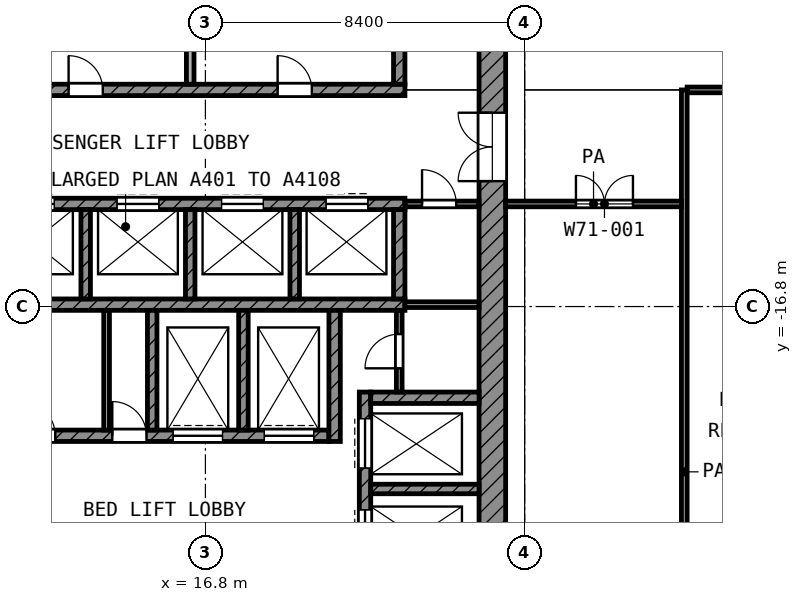
"""IFC4 building model, lengths in metres.
Left out: names, types, materials, properties, quantities, classifications, styles, units other than length and angle.
Written with IfcOpenShell. Run it as: python <this file> out.ifc"""

import sys

from ifc_helpers import new_model, si_unit, direction, frame, frame_2d, origin, place, context, subcontext, project, spatial, rectangle, extrude, element, fill, save


model = new_model("IFC4")
c1 = context("Model", 3, precision=1e-05, world=origin(), true_north=direction((0.0, 1.0)))
c2 = subcontext(c1, "Body", "Model", "MODEL_VIEW")
j1 = project(units=[si_unit("LENGTHUNIT", "METRE"), si_unit("PLANEANGLEUNIT", "RADIAN")], contexts=[c1])
p1 = place(None, origin())
s1 = spatial("IfcSite", under=j1, at=p1, CompositionType="ELEMENT")
p2 = place(p1, origin())
s2 = spatial("IfcBuilding", under=s1, at=p2, CompositionType="ELEMENT")
p3 = place(p2, frame((0.0, 0.0, 328.0)))
s3 = spatial("IfcBuildingStorey", under=s2, at=p3, CompositionType="ELEMENT", Elevation=328.0)
p4 = place(p3, frame((24.35, -24.0, 0.0), z_axis=(0.0, 0.0, 1.0), x_axis=(0.0, 1.0, 0.0)))
e1 = element("IfcWall", 1, at=p4, inside=s3, PredefinedType="SHEAR", context=c2, shape_type="SweptSolid", body=[
    extrude(rectangle(XDim=18.6, YDim=0.7, at=frame_2d((9.3, 0.0))), origin(), (0.0, 0.0, 1.0), 3.78),
])
p5 = place(p4, frame((10.5, 0.0, 0.0)))
e2 = element("IfcOpeningElement", 2, at=p5, cuts=e1, PredefinedType="OPENING", context=c2, shape_type="SweptSolid", body=[
    extrude(rectangle(XDim=1.8, YDim=2.1, at=frame_2d((0.9, 1.05))), frame((0.0, 0.36, 0.0), z_axis=(0.0, -1.0, 0.0), x_axis=(1.0, 0.0, 0.0)), (0.0, 0.0, 1.0), 0.72),
])
p6 = place(p3, frame((5.4, -11.1, 0.0), z_axis=(0.0, 0.0, 1.0), x_axis=(1.0, 0.0, 0.0)))
e3 = element("IfcWall", 3, at=p6, inside=s3, PredefinedType="SHEAR", context=c2, shape_type="SweptSolid", body=[
    extrude(rectangle(XDim=16.65, YDim=0.3, at=frame_2d((8.325, 0.0))), origin(), (0.0, 0.0, 1.0), 3.78),
])
p7 = place(p6, frame((2.3, 0.0, 0.0)))
e4 = element("IfcOpeningElement", 4, at=p7, cuts=e3, PredefinedType="OPENING", context=c2, shape_type="SweptSolid", body=[
    extrude(rectangle(XDim=0.9, YDim=2.1, at=frame_2d((0.45, 1.05))), frame((0.0, 0.16, 0.0), z_axis=(0.0, -1.0, 0.0), x_axis=(1.0, 0.0, 0.0)), (0.0, 0.0, 1.0), 0.32),
])
p8 = place(p6, frame((7.8, 0.0, 0.0)))
e5 = element("IfcOpeningElement", 5, at=p8, cuts=e3, PredefinedType="OPENING", context=c2, shape_type="SweptSolid", body=[
    extrude(rectangle(XDim=0.9, YDim=2.1, at=frame_2d((0.45, 1.05))), frame((0.0, 0.16, 0.0), z_axis=(0.0, -1.0, 0.0), x_axis=(1.0, 0.0, 0.0)), (0.0, 0.0, 1.0), 0.32),
])
p9 = place(p6, frame((13.3, 0.0, 0.0)))
e6 = element("IfcOpeningElement", 6, at=p9, cuts=e3, PredefinedType="OPENING", context=c2, shape_type="SweptSolid", body=[
    extrude(rectangle(XDim=0.9, YDim=2.1, at=frame_2d((0.45, 1.05))), frame((0.0, 0.16, 0.0), z_axis=(0.0, -1.0, 0.0), x_axis=(1.0, 0.0, 0.0)), (0.0, 0.0, 1.0), 0.32),
])
p10 = place(p3, frame((5.4, -14.1, 0.0), z_axis=(0.0, 0.0, 1.0), x_axis=(1.0, 0.0, 0.0)))
e7 = element("IfcWall", 7, at=p10, inside=s3, PredefinedType="SHEAR", context=c2, shape_type="SweptSolid", body=[
    extrude(rectangle(XDim=16.65, YDim=0.3, at=frame_2d((8.325, 0.0))), origin(), (0.0, 0.0, 1.0), 3.78),
])
p11 = place(p10, frame((6.325, 0.0, 0.0)))
e8 = element("IfcOpeningElement", 8, at=p11, cuts=e7, PredefinedType="OPENING", context=c2, shape_type="SweptSolid", body=[
    extrude(rectangle(XDim=1.1, YDim=2.1, at=frame_2d((0.55, 1.05))), frame((0.0, 0.16, 0.0), z_axis=(0.0, -1.0, 0.0), x_axis=(1.0, 0.0, 0.0)), (0.0, 0.0, 1.0), 0.32),
])
p12 = place(p10, frame((9.075, 0.0, 0.0)))
e9 = element("IfcOpeningElement", 9, at=p12, cuts=e7, PredefinedType="OPENING", context=c2, shape_type="SweptSolid", body=[
    extrude(rectangle(XDim=1.1, YDim=2.1, at=frame_2d((0.55, 1.05))), frame((0.0, 0.16, 0.0), z_axis=(0.0, -1.0, 0.0), x_axis=(1.0, 0.0, 0.0)), (0.0, 0.0, 1.0), 0.32),
])
p13 = place(p10, frame((11.825, 0.0, 0.0)))
e10 = element("IfcOpeningElement", 10, at=p13, cuts=e7, PredefinedType="OPENING", context=c2, shape_type="SweptSolid", body=[
    extrude(rectangle(XDim=1.1, YDim=2.1, at=frame_2d((0.55, 1.05))), frame((0.0, 0.16, 0.0), z_axis=(0.0, -1.0, 0.0), x_axis=(1.0, 0.0, 0.0)), (0.0, 0.0, 1.0), 0.32),
])
p14 = place(p10, frame((14.575, 0.0, 0.0)))
e11 = element("IfcOpeningElement", 11, at=p14, cuts=e7, PredefinedType="OPENING", context=c2, shape_type="SweptSolid", body=[
    extrude(rectangle(XDim=1.1, YDim=2.1, at=frame_2d((0.55, 1.05))), frame((0.0, 0.16, 0.0), z_axis=(0.0, -1.0, 0.0), x_axis=(1.0, 0.0, 0.0)), (0.0, 0.0, 1.0), 0.32),
])
p15 = place(p10, frame((2.3, 0.0, 0.0)))
e12 = element("IfcOpeningElement", 12, at=p15, cuts=e7, PredefinedType="OPENING", context=c2, shape_type="SweptSolid", body=[
    extrude(rectangle(XDim=0.9, YDim=2.1, at=frame_2d((0.45, 1.05))), frame((0.0, 0.16, 0.0), z_axis=(0.0, -1.0, 0.0), x_axis=(1.0, 0.0, 0.0)), (0.0, 0.0, 1.0), 0.32),
])
p16 = place(p3, frame((5.4, -16.75, 0.0), z_axis=(0.0, 0.0, 1.0), x_axis=(1.0, 0.0, 0.0)))
e13 = element("IfcWall", 13, at=p16, inside=s3, PredefinedType="SHEAR", context=c2, shape_type="SweptSolid", body=[
    extrude(rectangle(XDim=16.65, YDim=0.3, at=frame_2d((8.325, 0.0))), origin(), (0.0, 0.0, 1.0), 3.78),
])
p17 = place(p3, frame((5.4, -20.2, 0.0), z_axis=(0.0, 0.0, 1.0), x_axis=(1.0, 0.0, 0.0)))
e14 = element("IfcWall", 14, at=p17, inside=s3, PredefinedType="SHEAR", context=c2, shape_type="SweptSolid", body=[
    extrude(rectangle(XDim=14.65, YDim=0.3, at=frame_2d((7.325, 0.0))), origin(), (0.0, 0.0, 1.0), 3.78),
])
p18 = place(p17, frame((10.55, 0.0, 0.0)))
e15 = element("IfcOpeningElement", 15, at=p18, cuts=e14, PredefinedType="OPENING", context=c2, shape_type="SweptSolid", body=[
    extrude(rectangle(XDim=1.3, YDim=2.1, at=frame_2d((0.65, 1.05))), frame((0.0, 0.16, 0.0), z_axis=(0.0, -1.0, 0.0), x_axis=(1.0, 0.0, 0.0)), (0.0, 0.0, 1.0), 0.32),
])
p19 = place(p17, frame((12.95, 0.0, 0.0)))
e16 = element("IfcOpeningElement", 16, at=p19, cuts=e14, PredefinedType="OPENING", context=c2, shape_type="SweptSolid", body=[
    extrude(rectangle(XDim=1.3, YDim=2.1, at=frame_2d((0.65, 1.05))), frame((0.0, 0.16, 0.0), z_axis=(0.0, -1.0, 0.0), x_axis=(1.0, 0.0, 0.0)), (0.0, 0.0, 1.0), 0.32),
])
p20 = place(p17, frame((0.55, 0.0, 0.0)))
e17 = element("IfcOpeningElement", 17, at=p20, cuts=e14, PredefinedType="OPENING", context=c2, shape_type="SweptSolid", body=[
    extrude(rectangle(XDim=1.3, YDim=2.1, at=frame_2d((0.65, 1.05))), frame((0.0, 0.16, 0.0), z_axis=(0.0, -1.0, 0.0), x_axis=(1.0, 0.0, 0.0)), (0.0, 0.0, 1.0), 0.32),
])
p21 = place(p17, frame((2.95, 0.0, 0.0)))
e18 = element("IfcOpeningElement", 18, at=p21, cuts=e14, PredefinedType="OPENING", context=c2, shape_type="SweptSolid", body=[
    extrude(rectangle(XDim=1.3, YDim=2.1, at=frame_2d((0.65, 1.05))), frame((0.0, 0.16, 0.0), z_axis=(0.0, -1.0, 0.0), x_axis=(1.0, 0.0, 0.0)), (0.0, 0.0, 1.0), 0.32),
])
p22 = place(p17, frame((6.55, 0.0, 0.0)))
e19 = element("IfcOpeningElement", 19, at=p22, cuts=e14, PredefinedType="OPENING", context=c2, shape_type="SweptSolid", body=[
    extrude(rectangle(XDim=0.9, YDim=2.1, at=frame_2d((0.45, 1.05))), frame((0.0, 0.16, 0.0), z_axis=(0.0, -1.0, 0.0), x_axis=(1.0, 0.0, 0.0)), (0.0, 0.0, 1.0), 0.32),
])
p23 = place(p17, frame((8.95, 0.0, 0.0)))
e20 = element("IfcOpeningElement", 20, at=p23, cuts=e14, PredefinedType="OPENING", context=c2, shape_type="SweptSolid", body=[
    extrude(rectangle(XDim=0.9, YDim=2.1, at=frame_2d((0.45, 1.05))), frame((0.0, 0.16, 0.0), z_axis=(0.0, -1.0, 0.0), x_axis=(1.0, 0.0, 0.0)), (0.0, 0.0, 1.0), 0.32),
])
p24 = place(p3, frame((20.2, -20.35, 0.0), z_axis=(0.0, 0.0, 1.0), x_axis=(0.0, 1.0, 0.0)))
e21 = element("IfcWall", 21, at=p24, inside=s3, PredefinedType="SHEAR", context=c2, shape_type="SweptSolid", body=[
    extrude(rectangle(XDim=3.45, YDim=0.3, at=frame_2d((1.725, 0.0))), origin(), (0.0, 0.0, 1.0), 3.78),
])
p25 = place(p3, frame((21.9, -10.95, 0.0), z_axis=(0.0, 0.0, 1.0), x_axis=(0.0, 1.0, 0.0)))
e22 = element("IfcWall", 22, at=p25, inside=s3, PredefinedType="SHEAR", context=c2, shape_type="SweptSolid", body=[
    extrude(rectangle(XDim=2.35, YDim=0.3, at=frame_2d((1.175, 0.0))), origin(), (0.0, 0.0, 1.0), 3.78),
])
p26 = place(p3, frame((21.9, -16.6, 0.0), z_axis=(0.0, 0.0, 1.0), x_axis=(0.0, 1.0, 0.0)))
e23 = element("IfcWall", 23, at=p26, inside=s3, PredefinedType="SHEAR", context=c2, shape_type="SweptSolid", body=[
    extrude(rectangle(XDim=2.35, YDim=0.3, at=frame_2d((1.175, 0.0))), origin(), (0.0, 0.0, 1.0), 3.78),
])
p27 = place(p3, frame((21.15, -19.2, 0.0), z_axis=(0.0, 0.0, 1.0), x_axis=(1.0, 0.0, 0.0)))
e24 = element("IfcWall", 24, at=p27, inside=s3, PredefinedType="SHEAR", context=c2, shape_type="SweptSolid", body=[
    extrude(rectangle(XDim=2.85, YDim=0.3, at=frame_2d((1.425, 0.0))), origin(), (0.0, 0.0, 1.0), 3.78),
])
p28 = place(p3, frame((21.0, -24.0, 0.0), z_axis=(0.0, 0.0, 1.0), x_axis=(0.0, 1.0, 0.0)))
e25 = element("IfcWall", 25, at=p28, inside=s3, PredefinedType="SHEAR", context=c2, shape_type="SweptSolid", body=[
    extrude(rectangle(XDim=4.95, YDim=0.3, at=frame_2d((2.475, 0.0))), origin(), (0.0, 0.0, 1.0), 3.78),
])
p29 = place(p28, frame((2.95, 0.0, 0.0)))
e26 = element("IfcOpeningElement", 26, at=p29, cuts=e25, PredefinedType="OPENING", context=c2, shape_type="SweptSolid", body=[
    extrude(rectangle(XDim=1.3, YDim=2.1, at=frame_2d((0.65, 1.05))), frame((0.0, 0.16, 0.0), z_axis=(0.0, -1.0, 0.0), x_axis=(1.0, 0.0, 0.0)), (0.0, 0.0, 1.0), 0.32),
])
p30 = place(p28, frame((0.55, 0.0, 0.0)))
e27 = element("IfcOpeningElement", 27, at=p30, cuts=e25, PredefinedType="OPENING", context=c2, shape_type="SweptSolid", body=[
    extrude(rectangle(XDim=1.3, YDim=2.1, at=frame_2d((0.65, 1.05))), frame((0.0, 0.16, 0.0), z_axis=(0.0, -1.0, 0.0), x_axis=(1.0, 0.0, 0.0)), (0.0, 0.0, 1.0), 0.32),
])
p31 = place(p3, frame((21.15, -21.6, 0.0), z_axis=(0.0, 0.0, 1.0), x_axis=(1.0, 0.0, 0.0)))
e28 = element("IfcWall", 28, at=p31, inside=s3, PredefinedType="SHEAR", context=c2, shape_type="SweptSolid", body=[
    extrude(rectangle(XDim=2.85, YDim=0.25, at=frame_2d((1.425, 0.0))), origin(), (0.0, 0.0, 1.0), 3.78),
])
for number, where, z_axis, x_axis in (
    (29, (15.4, -20.05, 0.0), (0.0, 0.0, 1.0), (0.0, 1.0, 0.0)),
    (30, (17.8, -20.05, 0.0), (0.0, 0.0, 1.0), (0.0, 1.0, 0.0)),
):
    element("IfcWall", number, at=place(p3, frame(where, z_axis=z_axis, x_axis=x_axis)), inside=s3, PredefinedType="SHEAR", context=c2, shape_type="SweptSolid", body=[
        extrude(rectangle(XDim=3.15, YDim=0.25, at=frame_2d((1.575, 0.0))), origin(), (0.0, 0.0, 1.0), 3.78),
    ])
p32 = place(p3, frame((16.4, -10.95, 0.0), z_axis=(0.0, 0.0, 1.0), x_axis=(0.0, 1.0, 0.0)))
e31 = element("IfcWall", 31, at=p32, inside=s3, PredefinedType="PARTITIONING", context=c2, shape_type="SweptSolid", body=[
    extrude(rectangle(XDim=2.35, YDim=0.2, at=frame_2d((1.175, 0.0))), origin(), (0.0, 0.0, 1.0), 3.78),
])
for number, where, z_axis, x_axis in (
    (32, (13.65, -16.6, 0.0), (0.0, 0.0, 1.0), (0.0, 1.0, 0.0)),
    (33, (16.4, -16.6, 0.0), (0.0, 0.0, 1.0), (0.0, 1.0, 0.0)),
    (34, (19.15, -16.6, 0.0), (0.0, 0.0, 1.0), (0.0, 1.0, 0.0)),
):
    element("IfcWall", number, at=place(p3, frame(where, z_axis=z_axis, x_axis=x_axis)), inside=s3, PredefinedType="SHEAR", context=c2, shape_type="SweptSolid", body=[
        extrude(rectangle(XDim=2.35, YDim=0.25, at=frame_2d((1.175, 0.0))), origin(), (0.0, 0.0, 1.0), 3.78),
    ])
p33 = place(p3, frame((21.9, -19.05, 0.0), z_axis=(0.0, 0.0, 1.0), x_axis=(0.0, 1.0, 0.0)))
e35 = element("IfcWall", 35, at=p33, inside=s3, PredefinedType="PARTITIONING", context=c2, shape_type="SweptSolid", body=[
    extrude(rectangle(XDim=2.15, YDim=0.15, at=frame_2d((1.075, 0.0))), origin(), (0.0, 0.0, 1.0), 3.78),
])
p34 = place(p33, frame((0.625, 0.0, 0.0)))
e36 = element("IfcOpeningElement", 36, at=p34, cuts=e35, PredefinedType="OPENING", context=c2, shape_type="SweptSolid", body=[
    extrude(rectangle(XDim=0.9, YDim=2.1, at=frame_2d((0.45, 1.05))), frame((0.0, 0.085, 0.0), z_axis=(0.0, -1.0, 0.0), x_axis=(1.0, 0.0, 0.0)), (0.0, 0.0, 1.0), 0.17),
])
p35 = place(p3, frame((22.05, -16.75, 0.0), z_axis=(0.0, 0.0, 1.0), x_axis=(1.0, 0.0, 0.0)))
e37 = element("IfcWall", 37, at=p35, inside=s3, PredefinedType="PARTITIONING", context=c2, shape_type="SweptSolid", body=[
    extrude(rectangle(XDim=1.95, YDim=0.15, at=frame_2d((0.975, 0.0))), origin(), (0.0, 0.0, 1.0), 3.78),
])
p36 = place(p3, frame((22.05, -14.1, 0.0), z_axis=(0.0, 0.0, 1.0), x_axis=(1.0, 0.0, 0.0)))
e38 = element("IfcWall", 38, at=p36, inside=s3, PredefinedType="PARTITIONING", context=c2, shape_type="SweptSolid", body=[
    extrude(rectangle(XDim=1.95, YDim=0.15, at=frame_2d((0.975, 0.0))), origin(), (0.0, 0.0, 1.0), 3.78),
])
p37 = place(p36, frame((0.45, 0.0, 0.0)))
e39 = element("IfcOpeningElement", 39, at=p37, cuts=e38, PredefinedType="OPENING", context=c2, shape_type="SweptSolid", body=[
    extrude(rectangle(XDim=0.9, YDim=2.1, at=frame_2d((0.45, 1.05))), frame((0.0, 0.085, 0.0), z_axis=(0.0, -1.0, 0.0), x_axis=(1.0, 0.0, 0.0)), (0.0, 0.0, 1.0), 0.17),
])
p38 = place(p3, frame((14.2, -20.05, 0.0), z_axis=(0.0, 0.0, 1.0), x_axis=(0.0, 1.0, 0.0)))
e40 = element("IfcWall", 40, at=p38, inside=s3, PredefinedType="PARTITIONING", context=c2, shape_type="SweptSolid", body=[
    extrude(rectangle(XDim=3.15, YDim=0.15, at=frame_2d((1.575, 0.0))), origin(), (0.0, 0.0, 1.0), 3.78),
])
p39 = place(p3, frame((24.7, -14.1, 0.0), z_axis=(0.0, 0.0, 1.0), x_axis=(1.0, 0.0, 0.0)))
e41 = element("IfcWall", 41, at=p39, inside=s3, PredefinedType="PARTITIONING", context=c2, shape_type="SweptSolid", body=[
    extrude(rectangle(XDim=4.625, YDim=0.15, at=frame_2d((2.312, 0.0))), origin(), (0.0, 0.0, 1.0), 3.78),
])
p40 = place(p39, frame((1.85, 0.0, 0.0)))
e42 = element("IfcOpeningElement", 42, at=p40, cuts=e41, PredefinedType="OPENING", context=c2, shape_type="SweptSolid", body=[
    extrude(rectangle(XDim=1.5, YDim=2.1, at=frame_2d((0.75, 1.05))), frame((0.0, 0.085, 0.0), z_axis=(0.0, -1.0, 0.0), x_axis=(1.0, 0.0, 0.0)), (0.0, 0.0, 1.0), 0.17),
])
p41 = place(p3, frame((29.475, -11.1, 0.0), z_axis=(0.0, 0.0, 1.0), x_axis=(1.0, 0.0, 0.0)))
e43 = element("IfcWall", 43, at=p41, inside=s3, PredefinedType="PARTITIONING", context=c2, shape_type="SweptSolid", body=[
    extrude(rectangle(XDim=29.245, YDim=0.15, at=frame_2d((14.623, 0.0))), origin(), (0.0, 0.0, 1.0), 3.78),
])
p42 = place(p41, frame((1.425, 0.0, 0.0)))
e44 = element("IfcOpeningElement", 44, at=p42, cuts=e43, PredefinedType="OPENING", context=c2, shape_type="SweptSolid", body=[
    extrude(rectangle(XDim=1.2, YDim=2.1, at=frame_2d((0.6, 1.05))), frame((0.0, 0.085, 0.0), z_axis=(0.0, -1.0, 0.0), x_axis=(1.0, 0.0, 0.0)), (0.0, 0.0, 1.0), 0.17),
])
p43 = place(p41, frame((5.425, 0.0, 0.0)))
e45 = element("IfcOpeningElement", 45, at=p43, cuts=e43, PredefinedType="OPENING", context=c2, shape_type="SweptSolid", body=[
    extrude(rectangle(XDim=1.0, YDim=2.1, at=frame_2d((0.5, 1.05))), frame((0.0, 0.085, 0.0), z_axis=(0.0, -1.0, 0.0), x_axis=(1.0, 0.0, 0.0)), (0.0, 0.0, 1.0), 0.17),
])
p44 = place(p41, frame((13.825, 0.0, 0.0)))
e46 = element("IfcOpeningElement", 46, at=p44, cuts=e43, PredefinedType="OPENING", context=c2, shape_type="SweptSolid", body=[
    extrude(rectangle(XDim=1.2, YDim=2.1, at=frame_2d((0.6, 1.05))), frame((0.0, 0.085, 0.0), z_axis=(0.0, -1.0, 0.0), x_axis=(1.0, 0.0, 0.0)), (0.0, 0.0, 1.0), 0.17),
])
p45 = place(p41, frame((11.525, 0.0, 0.0)))
e47 = element("IfcOpeningElement", 47, at=p45, cuts=e43, PredefinedType="OPENING", context=c2, shape_type="SweptSolid", body=[
    extrude(rectangle(XDim=1.2, YDim=2.1, at=frame_2d((0.6, 1.05))), frame((0.0, 0.085, 0.0), z_axis=(0.0, -1.0, 0.0), x_axis=(1.0, 0.0, 0.0)), (0.0, 0.0, 1.0), 0.17),
])
p46 = place(p41, frame((18.325, 0.0, 0.0)))
e48 = element("IfcOpeningElement", 48, at=p46, cuts=e43, PredefinedType="OPENING", context=c2, shape_type="SweptSolid", body=[
    extrude(rectangle(XDim=1.0, YDim=2.1, at=frame_2d((0.5, 1.05))), frame((0.0, 0.085, 0.0), z_axis=(0.0, -1.0, 0.0), x_axis=(1.0, 0.0, 0.0)), (0.0, 0.0, 1.0), 0.17),
])
p47 = place(p41, frame((24.375, 0.0, 0.0)))
e49 = element("IfcOpeningElement", 49, at=p47, cuts=e43, PredefinedType="OPENING", context=c2, shape_type="SweptSolid", body=[
    extrude(rectangle(XDim=1.5, YDim=2.1, at=frame_2d((0.75, 1.05))), frame((0.0, 0.085, 0.0), z_axis=(0.0, -1.0, 0.0), x_axis=(1.0, 0.0, 0.0)), (0.0, 0.0, 1.0), 0.17),
])
p48 = place(p3, frame((29.4, -31.198, 0.0), z_axis=(0.0, 0.0, 1.0), x_axis=(0.0, 1.0, 0.0)))
e50 = element("IfcWall", 50, at=p48, inside=s3, PredefinedType="PARTITIONING", context=c2, shape_type="SweptSolid", body=[
    extrude(rectangle(XDim=20.098, YDim=0.15, at=frame_2d((10.049, 0.0))), origin(), (0.0, 0.0, 1.0), 3.78),
])
p49 = place(p11, origin())
e51 = element("IfcDoor", 51, at=p49, inside=s3, OperationType="DOUBLE_DOOR_SLIDING", PredefinedType="DOOR", context=c2, shape_type="SweptSolid", body=[
    extrude(rectangle(XDim=1.1, YDim=2.1, at=frame_2d((0.55, 1.05))), frame((0.0, 0.025, 0.0), z_axis=(0.0, -1.0, 0.0), x_axis=(1.0, 0.0, 0.0)), (0.0, 0.0, 1.0), 0.05),
])
fill(e8, e51)
p50 = place(p12, origin())
e52 = element("IfcDoor", 52, at=p50, inside=s3, OperationType="DOUBLE_DOOR_SLIDING", PredefinedType="DOOR", context=c2, shape_type="SweptSolid", body=[
    extrude(rectangle(XDim=1.1, YDim=2.1, at=frame_2d((0.55, 1.05))), frame((0.0, 0.025, 0.0), z_axis=(0.0, -1.0, 0.0), x_axis=(1.0, 0.0, 0.0)), (0.0, 0.0, 1.0), 0.05),
])
fill(e9, e52)
p51 = place(p13, origin())
e53 = element("IfcDoor", 53, at=p51, inside=s3, OperationType="DOUBLE_DOOR_SLIDING", PredefinedType="DOOR", context=c2, shape_type="SweptSolid", body=[
    extrude(rectangle(XDim=1.1, YDim=2.1, at=frame_2d((0.55, 1.05))), frame((0.0, 0.025, 0.0), z_axis=(0.0, -1.0, 0.0), x_axis=(1.0, 0.0, 0.0)), (0.0, 0.0, 1.0), 0.05),
])
fill(e10, e53)
p52 = place(p14, origin())
e54 = element("IfcDoor", 54, at=p52, inside=s3, OperationType="DOUBLE_DOOR_SLIDING", PredefinedType="DOOR", context=c2, shape_type="SweptSolid", body=[
    extrude(rectangle(XDim=1.1, YDim=2.1, at=frame_2d((0.55, 1.05))), frame((0.0, 0.025, 0.0), z_axis=(0.0, -1.0, 0.0), x_axis=(1.0, 0.0, 0.0)), (0.0, 0.0, 1.0), 0.05),
])
fill(e11, e54)
p53 = place(p29, origin())
e55 = element("IfcDoor", 55, at=p53, inside=s3, OperationType="DOUBLE_DOOR_SLIDING", PredefinedType="DOOR", context=c2, shape_type="SweptSolid", body=[
    extrude(rectangle(XDim=1.3, YDim=2.1, at=frame_2d((0.65, 1.05))), frame((0.0, 0.025, 0.0), z_axis=(0.0, -1.0, 0.0), x_axis=(1.0, 0.0, 0.0)), (0.0, 0.0, 1.0), 0.05),
])
fill(e26, e55)
p54 = place(p30, origin())
e56 = element("IfcDoor", 56, at=p54, inside=s3, OperationType="DOUBLE_DOOR_SLIDING", PredefinedType="DOOR", context=c2, shape_type="SweptSolid", body=[
    extrude(rectangle(XDim=1.3, YDim=2.1, at=frame_2d((0.65, 1.05))), frame((0.0, 0.025, 0.0), z_axis=(0.0, -1.0, 0.0), x_axis=(1.0, 0.0, 0.0)), (0.0, 0.0, 1.0), 0.05),
])
fill(e27, e56)
p55 = place(p18, origin())
e57 = element("IfcDoor", 57, at=p55, inside=s3, OperationType="DOUBLE_DOOR_SLIDING", PredefinedType="DOOR", context=c2, shape_type="SweptSolid", body=[
    extrude(rectangle(XDim=1.3, YDim=2.1, at=frame_2d((0.65, 1.05))), frame((0.0, 0.025, 0.0), z_axis=(0.0, -1.0, 0.0), x_axis=(1.0, 0.0, 0.0)), (0.0, 0.0, 1.0), 0.05),
])
fill(e15, e57)
p56 = place(p19, origin())
e58 = element("IfcDoor", 58, at=p56, inside=s3, OperationType="DOUBLE_DOOR_SLIDING", PredefinedType="DOOR", context=c2, shape_type="SweptSolid", body=[
    extrude(rectangle(XDim=1.3, YDim=2.1, at=frame_2d((0.65, 1.05))), frame((0.0, 0.025, 0.0), z_axis=(0.0, -1.0, 0.0), x_axis=(1.0, 0.0, 0.0)), (0.0, 0.0, 1.0), 0.05),
])
fill(e16, e58)
p57 = place(p5, origin())
e59 = element("IfcDoor", 59, at=p57, inside=s3, OperationType="DOUBLE_DOOR_SINGLE_SWING", PredefinedType="DOOR", context=c2, shape_type="SweptSolid", body=[
    extrude(rectangle(XDim=1.8, YDim=2.1, at=frame_2d((0.9, 1.05))), frame((0.0, 0.025, 0.0), z_axis=(0.0, -1.0, 0.0), x_axis=(1.0, 0.0, 0.0)), (0.0, 0.0, 1.0), 0.05),
])
fill(e2, e59)
p58 = place(p37, origin())
e60 = element("IfcDoor", 60, at=p58, inside=s3, OperationType="SINGLE_SWING_LEFT", PredefinedType="DOOR", context=c2, shape_type="SweptSolid", body=[
    extrude(rectangle(XDim=0.9, YDim=2.1, at=frame_2d((0.45, 1.05))), frame((0.0, 0.025, 0.0), z_axis=(0.0, -1.0, 0.0), x_axis=(1.0, 0.0, 0.0)), (0.0, 0.0, 1.0), 0.05),
])
fill(e39, e60)
p59 = place(p34, origin())
e61 = element("IfcDoor", 61, at=p59, inside=s3, OperationType="SINGLE_SWING_LEFT", PredefinedType="DOOR", context=c2, shape_type="SweptSolid", body=[
    extrude(rectangle(XDim=0.9, YDim=2.1, at=frame_2d((0.45, 1.05))), frame((0.0, 0.025, 0.0), z_axis=(0.0, -1.0, 0.0), x_axis=(1.0, 0.0, 0.0)), (0.0, 0.0, 1.0), 0.05),
])
fill(e36, e61)
p60 = place(p22, origin())
e62 = element("IfcDoor", 62, at=p60, inside=s3, OperationType="SINGLE_SWING_LEFT", PredefinedType="DOOR", context=c2, shape_type="SweptSolid", body=[
    extrude(rectangle(XDim=0.9, YDim=2.1, at=frame_2d((0.45, 1.05))), frame((0.0, 0.025, 0.0), z_axis=(0.0, -1.0, 0.0), x_axis=(1.0, 0.0, 0.0)), (0.0, 0.0, 1.0), 0.05),
])
fill(e19, e62)
p61 = place(p23, origin())
e63 = element("IfcDoor", 63, at=p61, inside=s3, OperationType="SINGLE_SWING_LEFT", PredefinedType="DOOR", context=c2, shape_type="SweptSolid", body=[
    extrude(rectangle(XDim=0.9, YDim=2.1, at=frame_2d((0.45, 1.05))), frame((0.0, 0.025, 0.0), z_axis=(0.0, -1.0, 0.0), x_axis=(1.0, 0.0, 0.0)), (0.0, 0.0, 1.0), 0.05),
])
fill(e20, e63)
p62 = place(p8, origin())
e64 = element("IfcDoor", 64, at=p62, inside=s3, OperationType="SINGLE_SWING_LEFT", PredefinedType="DOOR", context=c2, shape_type="SweptSolid", body=[
    extrude(rectangle(XDim=0.9, YDim=2.1, at=frame_2d((0.45, 1.05))), frame((0.0, 0.025, 0.0), z_axis=(0.0, -1.0, 0.0), x_axis=(1.0, 0.0, 0.0)), (0.0, 0.0, 1.0), 0.05),
])
fill(e5, e64)
p63 = place(p9, origin())
e65 = element("IfcDoor", 65, at=p63, inside=s3, OperationType="SINGLE_SWING_LEFT", PredefinedType="DOOR", context=c2, shape_type="SweptSolid", body=[
    extrude(rectangle(XDim=0.9, YDim=2.1, at=frame_2d((0.45, 1.05))), frame((0.0, 0.025, 0.0), z_axis=(0.0, -1.0, 0.0), x_axis=(1.0, 0.0, 0.0)), (0.0, 0.0, 1.0), 0.05),
])
fill(e6, e65)
p64 = place(p40, origin())
e66 = element("IfcDoor", 66, at=p64, inside=s3, OperationType="DOUBLE_DOOR_SINGLE_SWING", PredefinedType="DOOR", context=c2, shape_type="SweptSolid", body=[
    extrude(rectangle(XDim=1.5, YDim=2.1, at=frame_2d((0.75, 1.05))), frame((0.0, 0.025, 0.0), z_axis=(0.0, -1.0, 0.0), x_axis=(1.0, 0.0, 0.0)), (0.0, 0.0, 1.0), 0.05),
])
fill(e42, e66)
save(model, sys.argv[1])
